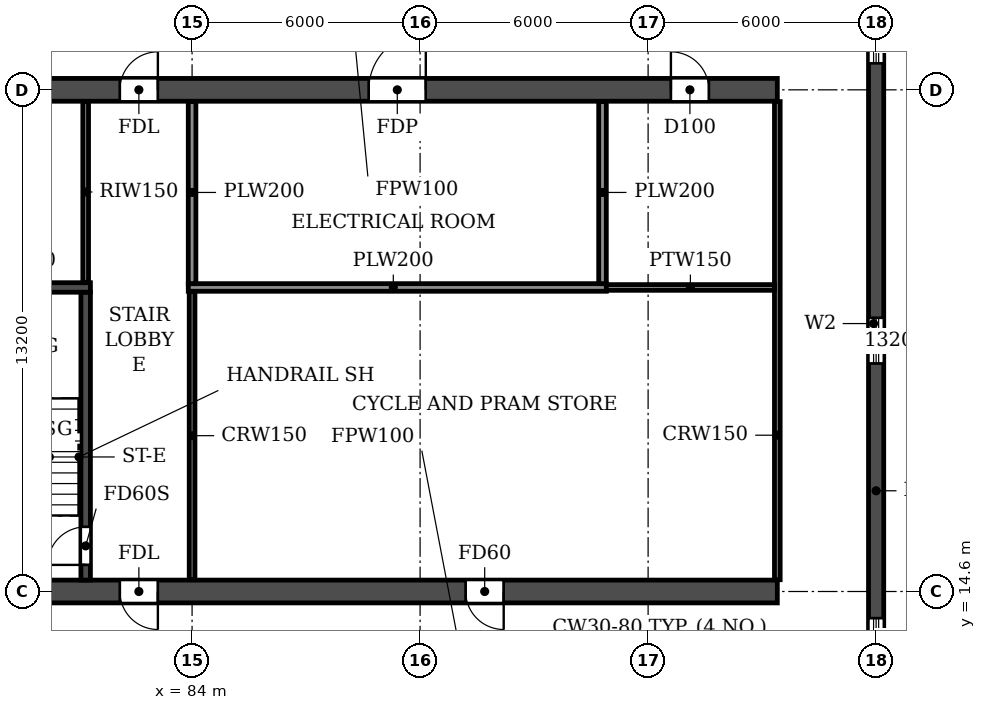
"""IFC4 building model, lengths in metres.
Left out: names, types, materials, properties, quantities, classifications, styles, units other than length and angle.
Written with IfcOpenShell. Run it as: python <this file> out.ifc"""

import sys

from ifc_helpers import new_model, si_unit, direction, frame, frame_2d, origin, place, context, subcontext, project, spatial, rectangle, extrude, element, fill, save


model = new_model("IFC4")
c1 = context("Model", 3, precision=1e-05, world=origin(), true_north=direction((0.0, 1.0)))
c2 = subcontext(c1, "Body", "Model", "MODEL_VIEW")
j1 = project(units=[si_unit("LENGTHUNIT", "METRE"), si_unit("PLANEANGLEUNIT", "RADIAN")], contexts=[c1])
p1 = place(None, origin())
s1 = spatial("IfcSite", under=j1, at=p1, CompositionType="ELEMENT")
p2 = place(p1, origin())
s2 = spatial("IfcBuilding", under=s1, at=p2, CompositionType="ELEMENT")
p3 = place(p2, frame((0.0, 0.0, 33.3)))
s3 = spatial("IfcBuildingStorey", under=s2, at=p3, CompositionType="ELEMENT", Elevation=33.3)
p4 = place(p3, frame((102.0, 4.683, 0.0), z_axis=(0.0, 0.0, 1.0), x_axis=(0.0, 1.0, 0.0)))
e1 = element("IfcWall", 1, at=p4, inside=s3, PredefinedType="SHEAR", context=c2, shape_type="SweptSolid", body=[
    extrude(rectangle(XDim=35.434, YDim=0.4, at=frame_2d((17.717, 0.0))), origin(), (0.0, 0.0, 1.0), 3.05),
])
p5 = place(p4, frame((15.917, 0.0, 0.9)))
e2 = element("IfcOpeningElement", 2, at=p5, cuts=e1, PredefinedType="OPENING", context=c2, shape_type="SweptSolid", body=[
    extrude(rectangle(XDim=1.2, YDim=1.5, at=frame_2d((0.6, 0.75))), frame((0.0, 0.21, 0.0), z_axis=(0.0, -1.0, 0.0), x_axis=(1.0, 0.0, 0.0)), (0.0, 0.0, 1.0), 0.42),
])
p6 = place(p4, frame((23.817, 0.0, 0.9)))
e3 = element("IfcOpeningElement", 3, at=p6, cuts=e1, PredefinedType="OPENING", context=c2, shape_type="SweptSolid", body=[
    extrude(rectangle(XDim=1.2, YDim=1.5, at=frame_2d((0.6, 0.75))), frame((0.0, 0.21, 0.0), z_axis=(0.0, -1.0, 0.0), x_axis=(1.0, 0.0, 0.0)), (0.0, 0.0, 1.0), 0.42),
])
p7 = place(p4, frame((8.017, 0.0, 0.9)))
e4 = element("IfcOpeningElement", 4, at=p7, cuts=e1, PredefinedType="OPENING", context=c2, shape_type="SweptSolid", body=[
    extrude(rectangle(XDim=1.2, YDim=1.5, at=frame_2d((0.6, 0.75))), frame((0.0, 0.21, 0.0), z_axis=(0.0, -1.0, 0.0), x_axis=(1.0, 0.0, 0.0)), (0.0, 0.0, 1.0), 0.42),
])
p8 = place(p4, frame((29.493, 0.0, 0.6)))
e5 = element("IfcOpeningElement", 5, at=p8, cuts=e1, PredefinedType="OPENING", context=c2, shape_type="SweptSolid", body=[
    extrude(rectangle(XDim=2.2, YDim=1.8, at=frame_2d((1.1, 0.9))), frame((0.0, 0.21, 0.0), z_axis=(0.0, -1.0, 0.0), x_axis=(1.0, 0.0, 0.0)), (0.0, 0.0, 1.0), 0.42),
])
p9 = place(p4, frame((2.541, 0.0, 0.6)))
e6 = element("IfcOpeningElement", 6, at=p9, cuts=e1, PredefinedType="OPENING", context=c2, shape_type="SweptSolid", body=[
    extrude(rectangle(XDim=2.2, YDim=1.8, at=frame_2d((1.1, 0.9))), frame((0.0, 0.21, 0.0), z_axis=(0.0, -1.0, 0.0), x_axis=(1.0, 0.0, 0.0)), (0.0, 0.0, 1.0), 0.42),
])
p10 = place(p3, frame((2.6, 14.6, 0.0), z_axis=(0.0, 0.0, 1.0), x_axis=(1.0, 0.0, 0.0)))
e7 = element("IfcWall", 7, at=p10, inside=s3, PredefinedType="SOLIDWALL", context=c2, shape_type="SweptSolid", body=[
    extrude(rectangle(XDim=96.8, YDim=0.6, at=frame_2d((48.4, 0.0))), origin(), (0.0, 0.0, 1.0), 3.05),
])
p11 = place(p10, frame((1.8, 0.0, 0.0)))
e8 = element("IfcOpeningElement", 8, at=p11, cuts=e7, PredefinedType="OPENING", context=c2, shape_type="SweptSolid", body=[
    extrude(rectangle(XDim=1.0, YDim=2.1, at=frame_2d((0.5, 1.05))), frame((0.0, 0.31, 0.0), z_axis=(0.0, -1.0, 0.0), x_axis=(1.0, 0.0, 0.0)), (0.0, 0.0, 1.0), 0.62),
])
p12 = place(p10, frame((9.5, 0.0, 0.0)))
e9 = element("IfcOpeningElement", 9, at=p12, cuts=e7, PredefinedType="OPENING", context=c2, shape_type="SweptSolid", body=[
    extrude(rectangle(XDim=1.0, YDim=2.1, at=frame_2d((0.5, 1.05))), frame((0.0, 0.31, 0.0), z_axis=(0.0, -1.0, 0.0), x_axis=(1.0, 0.0, 0.0)), (0.0, 0.0, 1.0), 0.62),
])
p13 = place(p10, frame((16.3, 0.0, 0.0)))
e10 = element("IfcOpeningElement", 10, at=p13, cuts=e7, PredefinedType="OPENING", context=c2, shape_type="SweptSolid", body=[
    extrude(rectangle(XDim=1.0, YDim=2.1, at=frame_2d((0.5, 1.05))), frame((0.0, 0.31, 0.0), z_axis=(0.0, -1.0, 0.0), x_axis=(1.0, 0.0, 0.0)), (0.0, 0.0, 1.0), 0.62),
])
p14 = place(p10, frame((24.2, 0.0, 0.0)))
e11 = element("IfcOpeningElement", 11, at=p14, cuts=e7, PredefinedType="OPENING", context=c2, shape_type="SweptSolid", body=[
    extrude(rectangle(XDim=1.0, YDim=2.1, at=frame_2d((0.5, 1.05))), frame((0.0, 0.31, 0.0), z_axis=(0.0, -1.0, 0.0), x_axis=(1.0, 0.0, 0.0)), (0.0, 0.0, 1.0), 0.62),
])
p15 = place(p10, frame((28.8, 0.0, 0.0)))
e12 = element("IfcOpeningElement", 12, at=p15, cuts=e7, PredefinedType="OPENING", context=c2, shape_type="SweptSolid", body=[
    extrude(rectangle(XDim=1.0, YDim=2.1, at=frame_2d((0.5, 1.05))), frame((0.0, 0.31, 0.0), z_axis=(0.0, -1.0, 0.0), x_axis=(1.0, 0.0, 0.0)), (0.0, 0.0, 1.0), 0.62),
])
p16 = place(p10, frame((42.7, 0.0, 0.0)))
e13 = element("IfcOpeningElement", 13, at=p16, cuts=e7, PredefinedType="OPENING", context=c2, shape_type="SweptSolid", body=[
    extrude(rectangle(XDim=1.0, YDim=2.1, at=frame_2d((0.5, 1.05))), frame((0.0, 0.31, 0.0), z_axis=(0.0, -1.0, 0.0), x_axis=(1.0, 0.0, 0.0)), (0.0, 0.0, 1.0), 0.62),
])
p17 = place(p10, frame((47.9, 0.0, 0.0)))
e14 = element("IfcOpeningElement", 14, at=p17, cuts=e7, PredefinedType="OPENING", context=c2, shape_type="SweptSolid", body=[
    extrude(rectangle(XDim=1.0, YDim=2.1, at=frame_2d((0.5, 1.05))), frame((0.0, 0.31, 0.0), z_axis=(0.0, -1.0, 0.0), x_axis=(1.0, 0.0, 0.0)), (0.0, 0.0, 1.0), 0.62),
])
p18 = place(p10, frame((53.1, 0.0, 0.0)))
e15 = element("IfcOpeningElement", 15, at=p18, cuts=e7, PredefinedType="OPENING", context=c2, shape_type="SweptSolid", body=[
    extrude(rectangle(XDim=1.0, YDim=2.1, at=frame_2d((0.5, 1.05))), frame((0.0, 0.31, 0.0), z_axis=(0.0, -1.0, 0.0), x_axis=(1.0, 0.0, 0.0)), (0.0, 0.0, 1.0), 0.62),
])
p19 = place(p10, frame((67.0, 0.0, 0.0)))
e16 = element("IfcOpeningElement", 16, at=p19, cuts=e7, PredefinedType="OPENING", context=c2, shape_type="SweptSolid", body=[
    extrude(rectangle(XDim=1.0, YDim=2.1, at=frame_2d((0.5, 1.05))), frame((0.0, 0.31, 0.0), z_axis=(0.0, -1.0, 0.0), x_axis=(1.0, 0.0, 0.0)), (0.0, 0.0, 1.0), 0.62),
])
p20 = place(p10, frame((71.6, 0.0, 0.0)))
e17 = element("IfcOpeningElement", 17, at=p20, cuts=e7, PredefinedType="OPENING", context=c2, shape_type="SweptSolid", body=[
    extrude(rectangle(XDim=1.0, YDim=2.1, at=frame_2d((0.5, 1.05))), frame((0.0, 0.31, 0.0), z_axis=(0.0, -1.0, 0.0), x_axis=(1.0, 0.0, 0.0)), (0.0, 0.0, 1.0), 0.62),
])
p21 = place(p10, frame((79.5, 0.0, 0.0)))
e18 = element("IfcOpeningElement", 18, at=p21, cuts=e7, PredefinedType="OPENING", context=c2, shape_type="SweptSolid", body=[
    extrude(rectangle(XDim=1.0, YDim=2.1, at=frame_2d((0.5, 1.05))), frame((0.0, 0.31, 0.0), z_axis=(0.0, -1.0, 0.0), x_axis=(1.0, 0.0, 0.0)), (0.0, 0.0, 1.0), 0.62),
])
p22 = place(p10, frame((88.6, 0.0, 0.0)))
e19 = element("IfcOpeningElement", 19, at=p22, cuts=e7, PredefinedType="OPENING", context=c2, shape_type="SweptSolid", body=[
    extrude(rectangle(XDim=1.0, YDim=2.1, at=frame_2d((0.5, 1.05))), frame((0.0, 0.31, 0.0), z_axis=(0.0, -1.0, 0.0), x_axis=(1.0, 0.0, 0.0)), (0.0, 0.0, 1.0), 0.62),
])
p23 = place(p3, frame((2.6, 27.8, 0.0), z_axis=(0.0, 0.0, 1.0), x_axis=(1.0, 0.0, 0.0)))
e20 = element("IfcWall", 20, at=p23, inside=s3, PredefinedType="SOLIDWALL", context=c2, shape_type="SweptSolid", body=[
    extrude(rectangle(XDim=96.8, YDim=0.6, at=frame_2d((48.4, 0.0))), origin(), (0.0, 0.0, 1.0), 3.05),
])
p24 = place(p23, frame((2.55, 0.0, 0.0)))
e21 = element("IfcOpeningElement", 21, at=p24, cuts=e20, PredefinedType="OPENING", context=c2, shape_type="SweptSolid", body=[
    extrude(rectangle(XDim=1.0, YDim=2.1, at=frame_2d((0.5, 1.05))), frame((0.0, 0.31, 0.0), z_axis=(0.0, -1.0, 0.0), x_axis=(1.0, 0.0, 0.0)), (0.0, 0.0, 1.0), 0.62),
])
p25 = place(p23, frame((10.25, 0.0, 0.0)))
e22 = element("IfcOpeningElement", 22, at=p25, cuts=e20, PredefinedType="OPENING", context=c2, shape_type="SweptSolid", body=[
    extrude(rectangle(XDim=1.0, YDim=2.1, at=frame_2d((0.5, 1.05))), frame((0.0, 0.31, 0.0), z_axis=(0.0, -1.0, 0.0), x_axis=(1.0, 0.0, 0.0)), (0.0, 0.0, 1.0), 0.62),
])
p26 = place(p23, frame((16.3, 0.0, 0.0)))
e23 = element("IfcOpeningElement", 23, at=p26, cuts=e20, PredefinedType="OPENING", context=c2, shape_type="SweptSolid", body=[
    extrude(rectangle(XDim=1.0, YDim=2.1, at=frame_2d((0.5, 1.05))), frame((0.0, 0.31, 0.0), z_axis=(0.0, -1.0, 0.0), x_axis=(1.0, 0.0, 0.0)), (0.0, 0.0, 1.0), 0.62),
])
p27 = place(p23, frame((19.65, 0.0, 0.0)))
e24 = element("IfcOpeningElement", 24, at=p27, cuts=e20, PredefinedType="OPENING", context=c2, shape_type="SweptSolid", body=[
    extrude(rectangle(XDim=0.9, YDim=2.1, at=frame_2d((0.45, 1.05))), frame((0.0, 0.31, 0.0), z_axis=(0.0, -1.0, 0.0), x_axis=(1.0, 0.0, 0.0)), (0.0, 0.0, 1.0), 0.62),
])
p28 = place(p23, frame((28.85, 0.0, 0.0)))
e25 = element("IfcOpeningElement", 25, at=p28, cuts=e20, PredefinedType="OPENING", context=c2, shape_type="SweptSolid", body=[
    extrude(rectangle(XDim=0.9, YDim=2.1, at=frame_2d((0.45, 1.05))), frame((0.0, 0.31, 0.0), z_axis=(0.0, -1.0, 0.0), x_axis=(1.0, 0.0, 0.0)), (0.0, 0.0, 1.0), 0.62),
])
p29 = place(p23, frame((34.6, 0.0, 0.0)))
e26 = element("IfcOpeningElement", 26, at=p29, cuts=e20, PredefinedType="OPENING", context=c2, shape_type="SweptSolid", body=[
    extrude(rectangle(XDim=1.0, YDim=2.1, at=frame_2d((0.5, 1.05))), frame((0.0, 0.31, 0.0), z_axis=(0.0, -1.0, 0.0), x_axis=(1.0, 0.0, 0.0)), (0.0, 0.0, 1.0), 0.62),
])
p30 = place(p23, frame((39.8, 0.0, 0.0)))
e27 = element("IfcOpeningElement", 27, at=p30, cuts=e20, PredefinedType="OPENING", context=c2, shape_type="SweptSolid", body=[
    extrude(rectangle(XDim=1.0, YDim=2.1, at=frame_2d((0.5, 1.05))), frame((0.0, 0.31, 0.0), z_axis=(0.0, -1.0, 0.0), x_axis=(1.0, 0.0, 0.0)), (0.0, 0.0, 1.0), 0.62),
])
p31 = place(p23, frame((45.0, 0.0, 0.0)))
e28 = element("IfcOpeningElement", 28, at=p31, cuts=e20, PredefinedType="OPENING", context=c2, shape_type="SweptSolid", body=[
    extrude(rectangle(XDim=1.0, YDim=2.1, at=frame_2d((0.5, 1.05))), frame((0.0, 0.31, 0.0), z_axis=(0.0, -1.0, 0.0), x_axis=(1.0, 0.0, 0.0)), (0.0, 0.0, 1.0), 0.62),
])
p32 = place(p23, frame((47.9, 0.0, 0.0)))
e29 = element("IfcOpeningElement", 29, at=p32, cuts=e20, PredefinedType="OPENING", context=c2, shape_type="SweptSolid", body=[
    extrude(rectangle(XDim=1.0, YDim=2.1, at=frame_2d((0.5, 1.05))), frame((0.0, 0.31, 0.0), z_axis=(0.0, -1.0, 0.0), x_axis=(1.0, 0.0, 0.0)), (0.0, 0.0, 1.0), 0.62),
])
p33 = place(p23, frame((50.8, 0.0, 0.0)))
e30 = element("IfcOpeningElement", 30, at=p33, cuts=e20, PredefinedType="OPENING", context=c2, shape_type="SweptSolid", body=[
    extrude(rectangle(XDim=1.0, YDim=2.1, at=frame_2d((0.5, 1.05))), frame((0.0, 0.31, 0.0), z_axis=(0.0, -1.0, 0.0), x_axis=(1.0, 0.0, 0.0)), (0.0, 0.0, 1.0), 0.62),
])
p34 = place(p23, frame((54.7, 0.0, 0.0)))
e31 = element("IfcOpeningElement", 31, at=p34, cuts=e20, PredefinedType="OPENING", context=c2, shape_type="SweptSolid", body=[
    extrude(rectangle(XDim=1.0, YDim=2.1, at=frame_2d((0.5, 1.05))), frame((0.0, 0.31, 0.0), z_axis=(0.0, -1.0, 0.0), x_axis=(1.0, 0.0, 0.0)), (0.0, 0.0, 1.0), 0.62),
])
p35 = place(p23, frame((61.2, 0.0, 0.0)))
e32 = element("IfcOpeningElement", 32, at=p35, cuts=e20, PredefinedType="OPENING", context=c2, shape_type="SweptSolid", body=[
    extrude(rectangle(XDim=1.0, YDim=2.1, at=frame_2d((0.5, 1.05))), frame((0.0, 0.31, 0.0), z_axis=(0.0, -1.0, 0.0), x_axis=(1.0, 0.0, 0.0)), (0.0, 0.0, 1.0), 0.62),
])
p36 = place(p23, frame((67.05, 0.0, 0.0)))
e33 = element("IfcOpeningElement", 33, at=p36, cuts=e20, PredefinedType="OPENING", context=c2, shape_type="SweptSolid", body=[
    extrude(rectangle(XDim=0.9, YDim=2.1, at=frame_2d((0.45, 1.05))), frame((0.0, 0.31, 0.0), z_axis=(0.0, -1.0, 0.0), x_axis=(1.0, 0.0, 0.0)), (0.0, 0.0, 1.0), 0.62),
])
p37 = place(p23, frame((76.25, 0.0, 0.0)))
e34 = element("IfcOpeningElement", 34, at=p37, cuts=e20, PredefinedType="OPENING", context=c2, shape_type="SweptSolid", body=[
    extrude(rectangle(XDim=0.9, YDim=2.1, at=frame_2d((0.45, 1.05))), frame((0.0, 0.31, 0.0), z_axis=(0.0, -1.0, 0.0), x_axis=(1.0, 0.0, 0.0)), (0.0, 0.0, 1.0), 0.62),
])
p38 = place(p23, frame((79.5, 0.0, 0.0)))
e35 = element("IfcOpeningElement", 35, at=p38, cuts=e20, PredefinedType="OPENING", context=c2, shape_type="SweptSolid", body=[
    extrude(rectangle(XDim=1.0, YDim=2.1, at=frame_2d((0.5, 1.05))), frame((0.0, 0.31, 0.0), z_axis=(0.0, -1.0, 0.0), x_axis=(1.0, 0.0, 0.0)), (0.0, 0.0, 1.0), 0.62),
])
p39 = place(p23, frame((86.05, 0.0, 0.0)))
e36 = element("IfcOpeningElement", 36, at=p39, cuts=e20, PredefinedType="OPENING", context=c2, shape_type="SweptSolid", body=[
    extrude(rectangle(XDim=1.5, YDim=2.1, at=frame_2d((0.75, 1.05))), frame((0.0, 0.31, 0.0), z_axis=(0.0, -1.0, 0.0), x_axis=(1.0, 0.0, 0.0)), (0.0, 0.0, 1.0), 0.62),
])
p40 = place(p23, frame((94.0, 0.0, 0.0)))
e37 = element("IfcOpeningElement", 37, at=p40, cuts=e20, PredefinedType="OPENING", context=c2, shape_type="SweptSolid", body=[
    extrude(rectangle(XDim=1.0, YDim=2.1, at=frame_2d((0.5, 1.05))), frame((0.0, 0.31, 0.0), z_axis=(0.0, -1.0, 0.0), x_axis=(1.0, 0.0, 0.0)), (0.0, 0.0, 1.0), 0.62),
])
p41 = place(p3, frame((81.2, 14.9, 0.0), z_axis=(0.0, 0.0, 1.0), x_axis=(0.0, 1.0, 0.0)))
e38 = element("IfcWall", 38, at=p41, inside=s3, PredefinedType="SOLIDWALL", context=c2, shape_type="SweptSolid", body=[
    extrude(rectangle(XDim=7.575, YDim=0.25, at=frame_2d((3.788, 0.0))), origin(), (0.0, 0.0, 1.0), 3.05),
])
p42 = place(p41, frame((0.4, 0.0, 0.0)))
e39 = element("IfcOpeningElement", 39, at=p42, cuts=e38, PredefinedType="OPENING", context=c2, shape_type="SweptSolid", body=[
    extrude(rectangle(XDim=1.0, YDim=2.1, at=frame_2d((0.5, 1.05))), frame((0.0, 0.135, 0.0), z_axis=(0.0, -1.0, 0.0), x_axis=(1.0, 0.0, 0.0)), (0.0, 0.0, 1.0), 0.27),
])
p43 = place(p3, frame((77.275, 22.6, 0.0), z_axis=(0.0, 0.0, 1.0), x_axis=(1.0, 0.0, 0.0)))
e40 = element("IfcWall", 40, at=p43, inside=s3, PredefinedType="SOLIDWALL", context=c2, shape_type="SweptSolid", body=[
    extrude(rectangle(XDim=4.05, YDim=0.25, at=frame_2d((2.025, 0.0))), origin(), (0.0, 0.0, 1.0), 3.05),
])
p44 = place(p3, frame((84.0, 14.91, 0.0), z_axis=(0.0, 0.0, 1.0), x_axis=(0.0, 1.0, 0.0)))
e41 = element("IfcWall", 41, at=p44, inside=s3, PredefinedType="PARTITIONING", context=c2, shape_type="SweptSolid", body=[
    extrude(rectangle(XDim=7.59, YDim=0.15, at=frame_2d((3.795, 0.0))), origin(), (0.0, 0.0, 1.0), 3.05),
])
p45 = place(p3, frame((99.4, 14.91, 0.0), z_axis=(0.0, 0.0, 1.0), x_axis=(0.0, 1.0, 0.0)))
e42 = element("IfcWall", 42, at=p45, inside=s3, PredefinedType="PARTITIONING", context=c2, shape_type="SweptSolid", body=[
    extrude(rectangle(XDim=12.58, YDim=0.15, at=frame_2d((6.29, 0.0))), origin(), (0.0, 0.0, 1.0), 3.05),
])
p46 = place(p3, frame((94.7, 22.6, 0.0), z_axis=(0.0, 0.0, 1.0), x_axis=(1.0, 0.0, 0.0)))
e43 = element("IfcWall", 43, at=p46, inside=s3, PredefinedType="PARTITIONING", context=c2, shape_type="SweptSolid", body=[
    extrude(rectangle(XDim=4.625, YDim=0.15, at=frame_2d((2.312, 0.0))), origin(), (0.0, 0.0, 1.0), 3.05),
])
p47 = place(p3, frame((83.9, 22.6, 0.0), z_axis=(0.0, 0.0, 1.0), x_axis=(1.0, 0.0, 0.0)))
e44 = element("IfcWall", 44, at=p47, inside=s3, PredefinedType="PARTITIONING", context=c2, shape_type="SweptSolid", body=[
    extrude(rectangle(XDim=11.0, YDim=0.2, at=frame_2d((5.5, 0.0))), origin(), (0.0, 0.0, 1.0), 3.05),
])
for number, where, z_axis, x_axis in (
    (45, (84.0, 22.7, 0.0), (0.0, 0.0, 1.0), (0.0, 1.0, 0.0)),
    (46, (94.8, 22.7, 0.0), (0.0, 0.0, 1.0), (0.0, 1.0, 0.0)),
):
    element("IfcWall", number, at=place(p3, frame(where, z_axis=z_axis, x_axis=x_axis)), inside=s3, PredefinedType="PARTITIONING", context=c2, shape_type="SweptSolid", body=[
        extrude(rectangle(XDim=4.79, YDim=0.2, at=frame_2d((2.395, 0.0))), origin(), (0.0, 0.0, 1.0), 3.05),
    ])
p48 = place(p3, frame((81.2, 22.735, 0.0), z_axis=(0.0, 0.0, 1.0), x_axis=(0.0, 1.0, 0.0)))
e47 = element("IfcWall", 47, at=p48, inside=s3, PredefinedType="PARTITIONING", context=c2, shape_type="SweptSolid", body=[
    extrude(rectangle(XDim=4.755, YDim=0.15, at=frame_2d((2.377, 0.0))), origin(), (0.0, 0.0, 1.0), 3.05),
])
p49 = place(p5, origin())
e48 = element("IfcWindow", 48, at=p49, inside=s3, PartitioningType="SINGLE_PANEL", PredefinedType="WINDOW", context=c2, shape_type="SweptSolid", body=[
    extrude(rectangle(XDim=1.2, YDim=1.5, at=frame_2d((0.6, 0.75))), frame((0.0, 0.03, 0.0), z_axis=(0.0, -1.0, 0.0), x_axis=(1.0, 0.0, 0.0)), (0.0, 0.0, 1.0), 0.06),
])
fill(e2, e48)
p50 = place(p6, origin())
e49 = element("IfcWindow", 49, at=p50, inside=s3, PartitioningType="SINGLE_PANEL", PredefinedType="WINDOW", context=c2, shape_type="SweptSolid", body=[
    extrude(rectangle(XDim=1.2, YDim=1.5, at=frame_2d((0.6, 0.75))), frame((0.0, 0.03, 0.0), z_axis=(0.0, -1.0, 0.0), x_axis=(1.0, 0.0, 0.0)), (0.0, 0.0, 1.0), 0.06),
])
fill(e3, e49)
p51 = place(p7, origin())
e50 = element("IfcWindow", 50, at=p51, inside=s3, PartitioningType="SINGLE_PANEL", PredefinedType="WINDOW", context=c2, shape_type="SweptSolid", body=[
    extrude(rectangle(XDim=1.2, YDim=1.5, at=frame_2d((0.6, 0.75))), frame((0.0, 0.03, 0.0), z_axis=(0.0, -1.0, 0.0), x_axis=(1.0, 0.0, 0.0)), (0.0, 0.0, 1.0), 0.06),
])
fill(e4, e50)
p52 = place(p38, origin())
e51 = element("IfcDoor", 51, at=p52, inside=s3, OperationType="SINGLE_SWING_RIGHT", PredefinedType="DOOR", context=c2, shape_type="SweptSolid", body=[
    extrude(rectangle(XDim=1.0, YDim=2.1, at=frame_2d((0.5, 1.05))), frame((0.0, 0.025, 0.0), z_axis=(0.0, -1.0, 0.0), x_axis=(1.0, 0.0, 0.0)), (0.0, 0.0, 1.0), 0.05),
])
fill(e35, e51)
p53 = place(p39, origin())
e52 = element("IfcDoor", 52, at=p53, inside=s3, OperationType="DOUBLE_DOOR_SINGLE_SWING", PredefinedType="DOOR", context=c2, shape_type="SweptSolid", body=[
    extrude(rectangle(XDim=1.5, YDim=2.1, at=frame_2d((0.75, 1.05))), frame((0.0, 0.025, 0.0), z_axis=(0.0, -1.0, 0.0), x_axis=(1.0, 0.0, 0.0)), (0.0, 0.0, 1.0), 0.05),
])
fill(e36, e52)
p54 = place(p40, origin())
e53 = element("IfcDoor", 53, at=p54, inside=s3, OperationType="SINGLE_SWING_LEFT", PredefinedType="DOOR", context=c2, shape_type="SweptSolid", body=[
    extrude(rectangle(XDim=1.0, YDim=2.1, at=frame_2d((0.5, 1.05))), frame((0.0, 0.025, 0.0), z_axis=(0.0, -1.0, 0.0), x_axis=(1.0, 0.0, 0.0)), (0.0, 0.0, 1.0), 0.05),
])
fill(e37, e53)
p55 = place(p21, frame((1.0, 0.0, 0.0), z_axis=(0.0, 0.0, 1.0), x_axis=(-1.0, 0.0, 0.0)))
e54 = element("IfcDoor", 54, at=p55, inside=s3, OperationType="SINGLE_SWING_LEFT", PredefinedType="DOOR", context=c2, shape_type="SweptSolid", body=[
    extrude(rectangle(XDim=1.0, YDim=2.1, at=frame_2d((0.5, 1.05))), frame((0.0, 0.025, 0.0), z_axis=(0.0, -1.0, 0.0), x_axis=(1.0, 0.0, 0.0)), (0.0, 0.0, 1.0), 0.05),
])
fill(e18, e54)
p56 = place(p22, frame((1.0, 0.0, 0.0), z_axis=(0.0, 0.0, 1.0), x_axis=(-1.0, 0.0, 0.0)))
e55 = element("IfcDoor", 55, at=p56, inside=s3, OperationType="SINGLE_SWING_LEFT", PredefinedType="DOOR", context=c2, shape_type="SweptSolid", body=[
    extrude(rectangle(XDim=1.0, YDim=2.1, at=frame_2d((0.5, 1.05))), frame((0.0, 0.025, 0.0), z_axis=(0.0, -1.0, 0.0), x_axis=(1.0, 0.0, 0.0)), (0.0, 0.0, 1.0), 0.05),
])
fill(e19, e55)
p57 = place(p42, origin())
e56 = element("IfcDoor", 56, at=p57, inside=s3, OperationType="SINGLE_SWING_LEFT", PredefinedType="DOOR", context=c2, shape_type="SweptSolid", body=[
    extrude(rectangle(XDim=1.0, YDim=2.1, at=frame_2d((0.5, 1.05))), frame((0.0, 0.025, 0.0), z_axis=(0.0, -1.0, 0.0), x_axis=(1.0, 0.0, 0.0)), (0.0, 0.0, 1.0), 0.05),
])
fill(e39, e56)
save(model, sys.argv[1])
